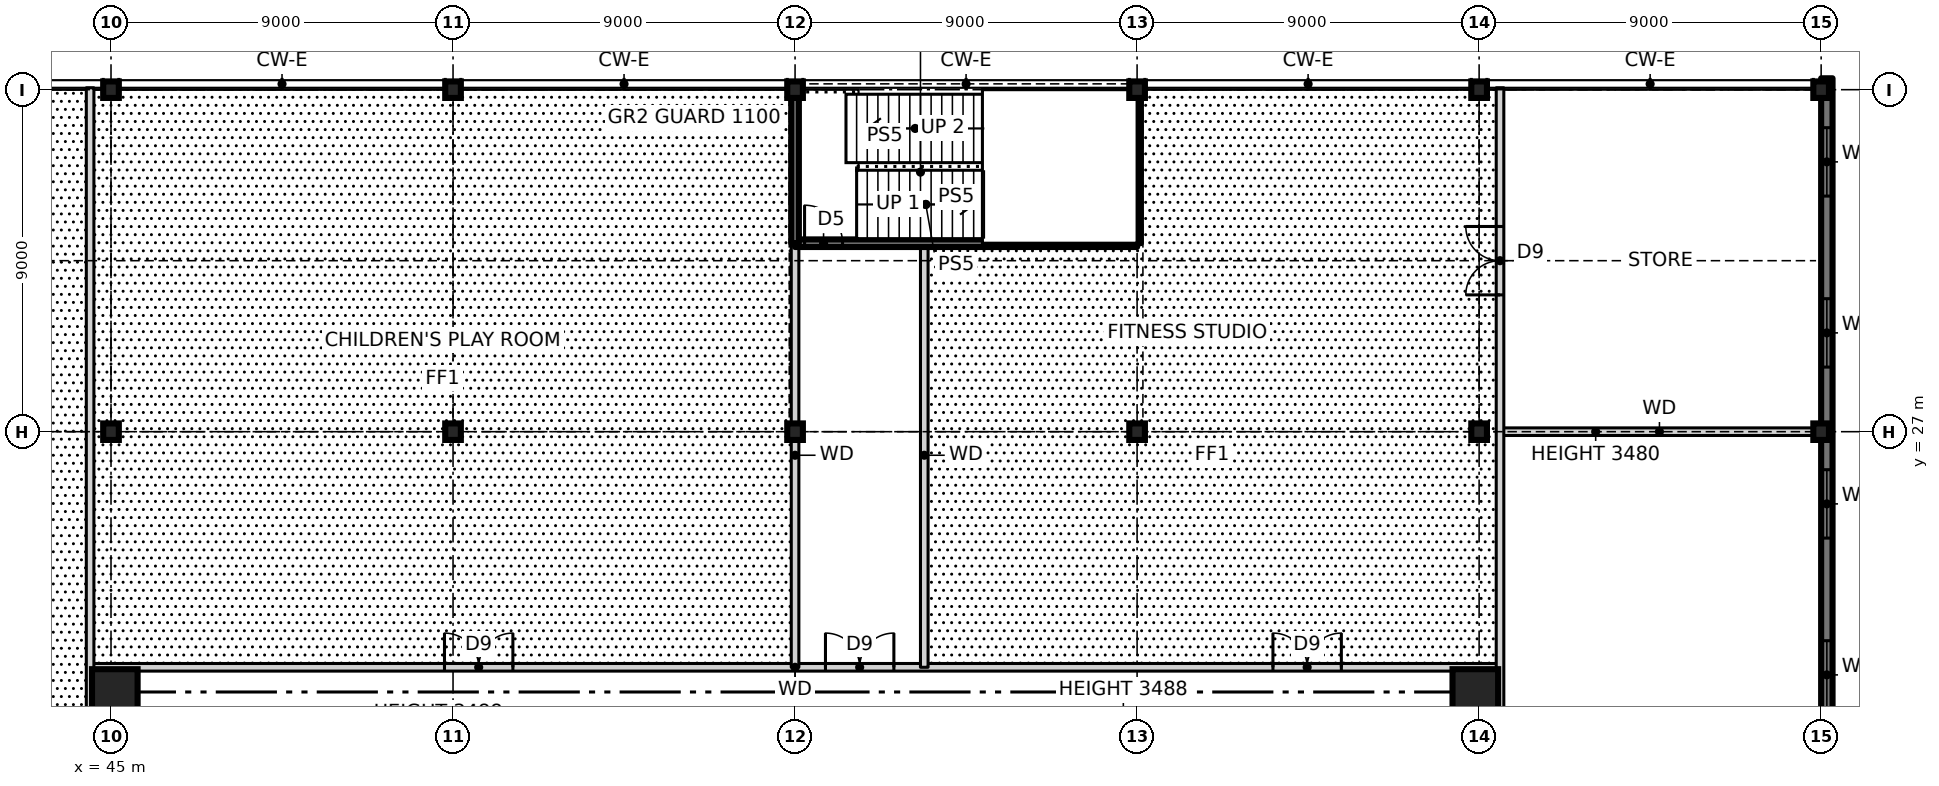
"""IFC4 building model, lengths in metres.
Left out: names, types, materials, properties, quantities, classifications, styles, units other than length and angle.
Written with IfcOpenShell. Run it as: python <this file> out.ifc"""

import sys

from ifc_helpers import new_model, si_unit, direction, frame, frame_2d, origin, origin_2d, place, context, subcontext, project, spatial, rectangle, hollow_rectangle, i_section, extrude, element, fill, save


model = new_model("IFC4")
c1 = context("Model", 3, precision=1e-05, world=origin(), true_north=direction((0.0, 1.0)))
c2 = subcontext(c1, "Body", "Model", "MODEL_VIEW")
j1 = project(units=[si_unit("LENGTHUNIT", "METRE"), si_unit("PLANEANGLEUNIT", "RADIAN")], contexts=[c1])
p1 = place(None, origin())
s1 = spatial("IfcSite", under=j1, at=p1, CompositionType="ELEMENT")
p2 = place(p1, origin())
s2 = spatial("IfcBuilding", under=s1, at=p2, CompositionType="ELEMENT")
p3 = place(p2, frame((0.0, 0.0, 6.0)))
s3 = spatial("IfcBuildingStorey", under=s2, at=p3, CompositionType="ELEMENT", Elevation=6.0)
for number, where, z_axis, x_axis in (
    (1, (80.9, 20.15, 0.0), (0.0, 0.0, 1.0), (1.0, 0.0, 0.0)),
    (2, (45.1, 20.15, 0.0), (0.0, 0.0, 1.0), (1.0, 0.0, 0.0)),
):
    element("IfcColumn", number, at=place(p3, frame(where, z_axis=z_axis, x_axis=x_axis)), inside=s3, PredefinedType="COLUMN", context=c2, shape_type="SweptSolid", body=[
        extrude(hollow_rectangle(XDim=1.2, YDim=1.2, WallThickness=0.07, at=origin_2d()), origin(), (0.0, 0.0, 1.0), 4.5),
    ])
for number, where, z_axis, x_axis in (
    (3, (45.0, 27.0, 0.0), (0.0, 0.0, 1.0), (1.0, 0.0, 0.0)),
    (4, (45.0, 36.0, 0.0), (0.0, 0.0, 1.0), (1.0, 0.0, 0.0)),
    (5, (54.0, 27.0, 0.0), (0.0, 0.0, 1.0), (1.0, 0.0, 0.0)),
    (6, (54.0, 36.0, 0.0), (0.0, 0.0, 1.0), (1.0, 0.0, 0.0)),
    (7, (63.0, 27.0, 0.0), (0.0, 0.0, 1.0), (1.0, 0.0, 0.0)),
    (8, (63.0, 36.0, 0.0), (0.0, 0.0, 1.0), (1.0, 0.0, 0.0)),
    (9, (72.0, 27.0, 0.0), (0.0, 0.0, 1.0), (1.0, 0.0, 0.0)),
    (10, (72.0, 36.0, 0.0), (0.0, 0.0, 1.0), (1.0, 0.0, 0.0)),
    (11, (81.0, 27.0, 0.0), (0.0, 0.0, 1.0), (1.0, 0.0, 0.0)),
    (12, (81.0, 36.0, 0.0), (0.0, 0.0, 1.0), (1.0, 0.0, 0.0)),
    (13, (90.0, 27.0, 0.0), (0.0, 0.0, 1.0), (1.0, 0.0, 0.0)),
    (14, (90.0, 36.0, 0.0), (0.0, 0.0, 1.0), (1.0, 0.0, 0.0)),
):
    element("IfcColumn", number, at=place(p3, frame(where, z_axis=z_axis, x_axis=x_axis)), inside=s3, PredefinedType="COLUMN", context=c2, shape_type="SweptSolid", body=[
        extrude(i_section(OverallWidth=0.411, OverallDepth=0.434, WebThickness=0.036, FlangeThickness=0.057, at=origin_2d()), origin(), (0.0, 0.0, 1.0), 4.5),
    ])
p4 = place(p3, frame((90.15, -36.3, -0.25), z_axis=(0.0, 0.0, 1.0), x_axis=(0.0, 1.0, 0.0)))
e15 = element("IfcWall", 15, at=p4, inside=s3, PredefinedType="SOLIDWALL", context=c2, shape_type="SweptSolid", body=[
    extrude(rectangle(XDim=72.6, YDim=0.3, at=frame_2d((36.3, 0.0))), origin(), (0.0, 0.0, 1.0), 3.73),
])
p5 = place(p4, frame((2.0, 0.0, 1.15)))
e16 = element("IfcOpeningElement", 16, at=p5, cuts=e15, PredefinedType="OPENING", context=c2, shape_type="SweptSolid", body=[
    extrude(rectangle(XDim=1.8, YDim=2.4, at=frame_2d((0.9, 1.2))), frame((0.0, 0.16, 0.0), z_axis=(0.0, -1.0, 0.0), x_axis=(1.0, 0.0, 0.0)), (0.0, 0.0, 1.0), 0.32),
])
p6 = place(p4, frame((6.5, 0.0, 1.15)))
e17 = element("IfcOpeningElement", 17, at=p6, cuts=e15, PredefinedType="OPENING", context=c2, shape_type="SweptSolid", body=[
    extrude(rectangle(XDim=1.8, YDim=2.4, at=frame_2d((0.9, 1.2))), frame((0.0, 0.16, 0.0), z_axis=(0.0, -1.0, 0.0), x_axis=(1.0, 0.0, 0.0)), (0.0, 0.0, 1.0), 0.32),
])
p7 = place(p4, frame((11.0, 0.0, 1.15)))
e18 = element("IfcOpeningElement", 18, at=p7, cuts=e15, PredefinedType="OPENING", context=c2, shape_type="SweptSolid", body=[
    extrude(rectangle(XDim=1.8, YDim=2.4, at=frame_2d((0.9, 1.2))), frame((0.0, 0.16, 0.0), z_axis=(0.0, -1.0, 0.0), x_axis=(1.0, 0.0, 0.0)), (0.0, 0.0, 1.0), 0.32),
])
p8 = place(p4, frame((15.5, 0.0, 1.15)))
e19 = element("IfcOpeningElement", 19, at=p8, cuts=e15, PredefinedType="OPENING", context=c2, shape_type="SweptSolid", body=[
    extrude(rectangle(XDim=1.8, YDim=2.4, at=frame_2d((0.9, 1.2))), frame((0.0, 0.16, 0.0), z_axis=(0.0, -1.0, 0.0), x_axis=(1.0, 0.0, 0.0)), (0.0, 0.0, 1.0), 0.32),
])
p9 = place(p4, frame((20.0, 0.0, 1.15)))
e20 = element("IfcOpeningElement", 20, at=p9, cuts=e15, PredefinedType="OPENING", context=c2, shape_type="SweptSolid", body=[
    extrude(rectangle(XDim=1.8, YDim=2.4, at=frame_2d((0.9, 1.2))), frame((0.0, 0.16, 0.0), z_axis=(0.0, -1.0, 0.0), x_axis=(1.0, 0.0, 0.0)), (0.0, 0.0, 1.0), 0.32),
])
p10 = place(p4, frame((24.5, 0.0, 1.15)))
e21 = element("IfcOpeningElement", 21, at=p10, cuts=e15, PredefinedType="OPENING", context=c2, shape_type="SweptSolid", body=[
    extrude(rectangle(XDim=1.8, YDim=2.4, at=frame_2d((0.9, 1.2))), frame((0.0, 0.16, 0.0), z_axis=(0.0, -1.0, 0.0), x_axis=(1.0, 0.0, 0.0)), (0.0, 0.0, 1.0), 0.32),
])
p11 = place(p4, frame((29.0, 0.0, 1.15)))
e22 = element("IfcOpeningElement", 22, at=p11, cuts=e15, PredefinedType="OPENING", context=c2, shape_type="SweptSolid", body=[
    extrude(rectangle(XDim=1.8, YDim=2.4, at=frame_2d((0.9, 1.2))), frame((0.0, 0.16, 0.0), z_axis=(0.0, -1.0, 0.0), x_axis=(1.0, 0.0, 0.0)), (0.0, 0.0, 1.0), 0.32),
])
p12 = place(p4, frame((42.5, 0.0, 1.15)))
e23 = element("IfcOpeningElement", 23, at=p12, cuts=e15, PredefinedType="OPENING", context=c2, shape_type="SweptSolid", body=[
    extrude(rectangle(XDim=1.8, YDim=2.4, at=frame_2d((0.9, 1.2))), frame((0.0, 0.16, 0.0), z_axis=(0.0, -1.0, 0.0), x_axis=(1.0, 0.0, 0.0)), (0.0, 0.0, 1.0), 0.32),
])
p13 = place(p4, frame((47.0, 0.0, 1.15)))
e24 = element("IfcOpeningElement", 24, at=p13, cuts=e15, PredefinedType="OPENING", context=c2, shape_type="SweptSolid", body=[
    extrude(rectangle(XDim=1.8, YDim=2.4, at=frame_2d((0.9, 1.2))), frame((0.0, 0.16, 0.0), z_axis=(0.0, -1.0, 0.0), x_axis=(1.0, 0.0, 0.0)), (0.0, 0.0, 1.0), 0.32),
])
p14 = place(p4, frame((51.5, 0.0, 1.15)))
e25 = element("IfcOpeningElement", 25, at=p14, cuts=e15, PredefinedType="OPENING", context=c2, shape_type="SweptSolid", body=[
    extrude(rectangle(XDim=1.8, YDim=2.4, at=frame_2d((0.9, 1.2))), frame((0.0, 0.16, 0.0), z_axis=(0.0, -1.0, 0.0), x_axis=(1.0, 0.0, 0.0)), (0.0, 0.0, 1.0), 0.32),
])
p15 = place(p4, frame((56.0, 0.0, 1.15)))
e26 = element("IfcOpeningElement", 26, at=p15, cuts=e15, PredefinedType="OPENING", context=c2, shape_type="SweptSolid", body=[
    extrude(rectangle(XDim=1.8, YDim=2.4, at=frame_2d((0.9, 1.2))), frame((0.0, 0.16, 0.0), z_axis=(0.0, -1.0, 0.0), x_axis=(1.0, 0.0, 0.0)), (0.0, 0.0, 1.0), 0.32),
])
p16 = place(p4, frame((60.5, 0.0, 1.15)))
e27 = element("IfcOpeningElement", 27, at=p16, cuts=e15, PredefinedType="OPENING", context=c2, shape_type="SweptSolid", body=[
    extrude(rectangle(XDim=1.8, YDim=2.4, at=frame_2d((0.9, 1.2))), frame((0.0, 0.16, 0.0), z_axis=(0.0, -1.0, 0.0), x_axis=(1.0, 0.0, 0.0)), (0.0, 0.0, 1.0), 0.32),
])
p17 = place(p4, frame((65.0, 0.0, 1.15)))
e28 = element("IfcOpeningElement", 28, at=p17, cuts=e15, PredefinedType="OPENING", context=c2, shape_type="SweptSolid", body=[
    extrude(rectangle(XDim=1.8, YDim=2.4, at=frame_2d((0.9, 1.2))), frame((0.0, 0.16, 0.0), z_axis=(0.0, -1.0, 0.0), x_axis=(1.0, 0.0, 0.0)), (0.0, 0.0, 1.0), 0.32),
])
p18 = place(p4, frame((69.5, 0.0, 1.15)))
e29 = element("IfcOpeningElement", 29, at=p18, cuts=e15, PredefinedType="OPENING", context=c2, shape_type="SweptSolid", body=[
    extrude(rectangle(XDim=1.8, YDim=2.4, at=frame_2d((0.9, 1.2))), frame((0.0, 0.16, 0.0), z_axis=(0.0, -1.0, 0.0), x_axis=(1.0, 0.0, 0.0)), (0.0, 0.0, 1.0), 0.32),
])
p19 = place(p2, origin())
s4 = spatial("IfcBuildingStorey", under=s2, at=p19, CompositionType="ELEMENT", Elevation=0.0)
p20 = place(p19, frame((44.494, 36.25, -0.15), z_axis=(0.0, 0.0, 1.0), x_axis=(0.0, 1.0, 0.0)))
e30 = element("IfcWall", 30, at=p20, inside=s4, PredefinedType="SOLIDWALL", context=c2, shape_type="SweptSolid", body=[
    extrude(rectangle(XDim=3.05, YDim=0.6, at=frame_2d((1.525, 0.0))), origin(), (0.0, 0.0, 1.0), 9.15),
])
p21 = place(p3, frame((44.45, 20.8, 0.0), z_axis=(0.0, 0.0, 1.0), x_axis=(1.0, 0.0, 0.0)))
e31 = element("IfcWall", 31, at=p21, inside=s3, PredefinedType="SOLIDWALL", context=c2, shape_type="SweptSolid", body=[
    extrude(rectangle(XDim=37.1, YDim=0.2, at=frame_2d((18.55, 0.0))), origin(), (0.0, 0.0, 1.0), 4.25),
])
p22 = place(p21, frame((9.325, 0.0, 0.0)))
e32 = element("IfcOpeningElement", 32, at=p22, cuts=e31, PredefinedType="OPENING", context=c2, shape_type="SweptSolid", body=[
    extrude(rectangle(XDim=1.8, YDim=2.1, at=frame_2d((0.9, 1.05))), frame((0.0, 0.11, 0.0), z_axis=(0.0, -1.0, 0.0), x_axis=(1.0, 0.0, 0.0)), (0.0, 0.0, 1.0), 0.22),
])
p23 = place(p21, frame((31.125, 0.0, 0.0)))
e33 = element("IfcOpeningElement", 33, at=p23, cuts=e31, PredefinedType="OPENING", context=c2, shape_type="SweptSolid", body=[
    extrude(rectangle(XDim=1.8, YDim=2.1, at=frame_2d((0.9, 1.05))), frame((0.0, 0.11, 0.0), z_axis=(0.0, -1.0, 0.0), x_axis=(1.0, 0.0, 0.0)), (0.0, 0.0, 1.0), 0.22),
])
p24 = place(p21, frame((19.35, 0.0, 0.0)))
e34 = element("IfcOpeningElement", 34, at=p24, cuts=e31, PredefinedType="OPENING", context=c2, shape_type="SweptSolid", body=[
    extrude(rectangle(XDim=1.8, YDim=2.1, at=frame_2d((0.9, 1.05))), frame((0.0, 0.11, 0.0), z_axis=(0.0, -1.0, 0.0), x_axis=(1.0, 0.0, 0.0)), (0.0, 0.0, 1.0), 0.22),
])
p25 = place(p3, frame((81.55, 27.0, 0.0), z_axis=(0.0, 0.0, 1.0), x_axis=(1.0, 0.0, 0.0)))
e35 = element("IfcWall", 35, at=p25, inside=s3, PredefinedType="SOLIDWALL", context=c2, shape_type="SweptSolid", body=[
    extrude(rectangle(XDim=8.39, YDim=0.2, at=frame_2d((4.195, 0.0))), origin(), (0.0, 0.0, 1.0), 3.48),
])
p26 = place(p3, frame((63.0, 31.96, 0.0), z_axis=(0.0, 0.0, 1.0), x_axis=(1.0, 0.0, 0.0)))
e36 = element("IfcWall", 36, at=p26, inside=s3, PredefinedType="SOLIDWALL", context=c2, shape_type="SweptSolid", body=[
    extrude(rectangle(XDim=9.0, YDim=0.2, at=frame_2d((4.5, 0.0))), origin(), (0.0, 0.0, 1.0), 4.5),
])
p27 = place(p26, frame((0.25, 0.0, 0.0)))
e37 = element("IfcOpeningElement", 37, at=p27, cuts=e36, PredefinedType="OPENING", context=c2, shape_type="SweptSolid", body=[
    extrude(rectangle(XDim=1.0, YDim=2.1, at=frame_2d((0.5, 1.05))), frame((0.0, 0.11, 0.0), z_axis=(0.0, -1.0, 0.0), x_axis=(1.0, 0.0, 0.0)), (0.0, 0.0, 1.0), 0.22),
])
p28 = place(p3, frame((81.55, -36.05, 0.0), z_axis=(0.0, 0.0, 1.0), x_axis=(0.0, 1.0, 0.0)))
e38 = element("IfcWall", 38, at=p28, inside=s3, PredefinedType="SOLIDWALL", context=c2, shape_type="SweptSolid", body=[
    extrude(rectangle(XDim=72.1, YDim=0.2, at=frame_2d((36.05, 0.0))), origin(), (0.0, 0.0, 1.0), 4.25),
])
p29 = place(p28, frame((66.65, 0.0, 0.0)))
e39 = element("IfcOpeningElement", 39, at=p29, cuts=e38, PredefinedType="OPENING", context=c2, shape_type="SweptSolid", body=[
    extrude(rectangle(XDim=1.8, YDim=2.1, at=frame_2d((0.9, 1.05))), frame((0.0, 0.11, 0.0), z_axis=(0.0, -1.0, 0.0), x_axis=(1.0, 0.0, 0.0)), (0.0, 0.0, 1.0), 0.22),
])
p30 = place(p28, frame((25.6, 0.0, 0.0)))
e40 = element("IfcOpeningElement", 40, at=p30, cuts=e38, PredefinedType="OPENING", context=c2, shape_type="SweptSolid", body=[
    extrude(rectangle(XDim=1.8, YDim=2.1, at=frame_2d((0.9, 1.05))), frame((0.0, 0.11, 0.0), z_axis=(0.0, -1.0, 0.0), x_axis=(1.0, 0.0, 0.0)), (0.0, 0.0, 1.0), 0.22),
])
p31 = place(p28, frame((35.45, 0.0, 0.0)))
e41 = element("IfcOpeningElement", 41, at=p31, cuts=e38, PredefinedType="OPENING", context=c2, shape_type="SweptSolid", body=[
    extrude(rectangle(XDim=1.8, YDim=2.1, at=frame_2d((0.9, 1.05))), frame((0.0, 0.11, 0.0), z_axis=(0.0, -1.0, 0.0), x_axis=(1.0, 0.0, 0.0)), (0.0, 0.0, 1.0), 0.22),
])
p32 = place(p28, frame((50.15, 0.0, 0.0)))
e42 = element("IfcOpeningElement", 42, at=p32, cuts=e38, PredefinedType="OPENING", context=c2, shape_type="SweptSolid", body=[
    extrude(rectangle(XDim=1.8, YDim=2.1, at=frame_2d((0.9, 1.05))), frame((0.0, 0.11, 0.0), z_axis=(0.0, -1.0, 0.0), x_axis=(1.0, 0.0, 0.0)), (0.0, 0.0, 1.0), 0.22),
])
p33 = place(p3, frame((72.0, 31.96, 0.0), z_axis=(0.0, 0.0, 1.0), x_axis=(0.0, 1.0, 0.0)))
e43 = element("IfcWall", 43, at=p33, inside=s3, PredefinedType="SOLIDWALL", context=c2, shape_type="SweptSolid", body=[
    extrude(rectangle(XDim=3.823, YDim=0.2, at=frame_2d((1.911, 0.0))), origin(), (0.0, 0.0, 1.0), 4.5),
])
for number, where, z_axis, x_axis in (
    (44, (66.4, 20.8, 0.0), (0.0, 0.0, 1.0), (0.0, 1.0, 0.0)),
    (45, (63.0, 20.8, 0.0), (0.0, 0.0, 1.0), (0.0, 1.0, 0.0)),
):
    element("IfcWall", number, at=place(p3, frame(where, z_axis=z_axis, x_axis=x_axis)), inside=s3, PredefinedType="SOLIDWALL", context=c2, shape_type="SweptSolid", body=[
        extrude(rectangle(XDim=11.16, YDim=0.2, at=frame_2d((5.58, 0.0))), origin(), (0.0, 0.0, 1.0), 4.25),
    ])
p34 = place(p3, frame((63.0, 31.96, 0.0), z_axis=(0.0, 0.0, 1.0), x_axis=(0.0, 1.0, 0.0)))
e46 = element("IfcWall", 46, at=p34, inside=s3, PredefinedType="SOLIDWALL", context=c2, shape_type="SweptSolid", body=[
    extrude(rectangle(XDim=3.823, YDim=0.2, at=frame_2d((1.911, 0.0))), origin(), (0.0, 0.0, 1.0), 4.5),
])
p35 = place(p3, frame((44.45, -36.05, 0.0), z_axis=(0.0, 0.0, 1.0), x_axis=(0.0, 1.0, 0.0)))
e47 = element("IfcWall", 47, at=p35, inside=s3, PredefinedType="SOLIDWALL", context=c2, shape_type="SweptSolid", body=[
    extrude(rectangle(XDim=72.1, YDim=0.2, at=frame_2d((36.05, 0.0))), origin(), (0.0, 0.0, 1.0), 4.25),
])
p36 = place(p35, frame((25.6, 0.0, 0.0)))
e48 = element("IfcOpeningElement", 48, at=p36, cuts=e47, PredefinedType="OPENING", context=c2, shape_type="SweptSolid", body=[
    extrude(rectangle(XDim=1.8, YDim=2.1, at=frame_2d((0.9, 1.05))), frame((0.0, 0.11, 0.0), z_axis=(0.0, -1.0, 0.0), x_axis=(1.0, 0.0, 0.0)), (0.0, 0.0, 1.0), 0.22),
])
p37 = place(p35, frame((44.7, 0.0, 0.0)))
e49 = element("IfcOpeningElement", 49, at=p37, cuts=e47, PredefinedType="OPENING", context=c2, shape_type="SweptSolid", body=[
    extrude(rectangle(XDim=1.8, YDim=2.1, at=frame_2d((0.9, 1.05))), frame((0.0, 0.11, 0.0), z_axis=(0.0, -1.0, 0.0), x_axis=(1.0, 0.0, 0.0)), (0.0, 0.0, 1.0), 0.22),
])
p38 = place(p15, origin())
e50 = element("IfcWindow", 50, at=p38, inside=s3, PartitioningType="SINGLE_PANEL", PredefinedType="WINDOW", context=c2, shape_type="SweptSolid", body=[
    extrude(rectangle(XDim=1.8, YDim=2.4, at=frame_2d((0.9, 1.2))), frame((0.0, 0.03, 0.0), z_axis=(0.0, -1.0, 0.0), x_axis=(1.0, 0.0, 0.0)), (0.0, 0.0, 1.0), 0.06),
])
fill(e26, e50)
p39 = place(p16, origin())
e51 = element("IfcWindow", 51, at=p39, inside=s3, PartitioningType="SINGLE_PANEL", PredefinedType="WINDOW", context=c2, shape_type="SweptSolid", body=[
    extrude(rectangle(XDim=1.8, YDim=2.4, at=frame_2d((0.9, 1.2))), frame((0.0, 0.03, 0.0), z_axis=(0.0, -1.0, 0.0), x_axis=(1.0, 0.0, 0.0)), (0.0, 0.0, 1.0), 0.06),
])
fill(e27, e51)
p40 = place(p17, origin())
e52 = element("IfcWindow", 52, at=p40, inside=s3, PartitioningType="SINGLE_PANEL", PredefinedType="WINDOW", context=c2, shape_type="SweptSolid", body=[
    extrude(rectangle(XDim=1.8, YDim=2.4, at=frame_2d((0.9, 1.2))), frame((0.0, 0.03, 0.0), z_axis=(0.0, -1.0, 0.0), x_axis=(1.0, 0.0, 0.0)), (0.0, 0.0, 1.0), 0.06),
])
fill(e28, e52)
p41 = place(p18, origin())
e53 = element("IfcWindow", 53, at=p41, inside=s3, PartitioningType="SINGLE_PANEL", PredefinedType="WINDOW", context=c2, shape_type="SweptSolid", body=[
    extrude(rectangle(XDim=1.8, YDim=2.4, at=frame_2d((0.9, 1.2))), frame((0.0, 0.03, 0.0), z_axis=(0.0, -1.0, 0.0), x_axis=(1.0, 0.0, 0.0)), (0.0, 0.0, 1.0), 0.06),
])
fill(e29, e53)
p42 = place(p22, origin())
e54 = element("IfcDoor", 54, at=p42, inside=s3, OperationType="DOUBLE_DOOR_SINGLE_SWING", PredefinedType="DOOR", context=c2, shape_type="SweptSolid", body=[
    extrude(rectangle(XDim=1.8, YDim=2.1, at=frame_2d((0.9, 1.05))), frame((0.0, 0.025, 0.0), z_axis=(0.0, -1.0, 0.0), x_axis=(1.0, 0.0, 0.0)), (0.0, 0.0, 1.0), 0.05),
])
fill(e32, e54)
p43 = place(p23, origin())
e55 = element("IfcDoor", 55, at=p43, inside=s3, OperationType="DOUBLE_DOOR_SINGLE_SWING", PredefinedType="DOOR", context=c2, shape_type="SweptSolid", body=[
    extrude(rectangle(XDim=1.8, YDim=2.1, at=frame_2d((0.9, 1.05))), frame((0.0, 0.025, 0.0), z_axis=(0.0, -1.0, 0.0), x_axis=(1.0, 0.0, 0.0)), (0.0, 0.0, 1.0), 0.05),
])
fill(e33, e55)
p44 = place(p29, origin())
e56 = element("IfcDoor", 56, at=p44, inside=s3, OperationType="DOUBLE_DOOR_SINGLE_SWING", PredefinedType="DOOR", context=c2, shape_type="SweptSolid", body=[
    extrude(rectangle(XDim=1.8, YDim=2.1, at=frame_2d((0.9, 1.05))), frame((0.0, 0.025, 0.0), z_axis=(0.0, -1.0, 0.0), x_axis=(1.0, 0.0, 0.0)), (0.0, 0.0, 1.0), 0.05),
])
fill(e39, e56)
p45 = place(p24, origin())
e57 = element("IfcDoor", 57, at=p45, inside=s3, OperationType="DOUBLE_DOOR_SINGLE_SWING", PredefinedType="DOOR", context=c2, shape_type="SweptSolid", body=[
    extrude(rectangle(XDim=1.8, YDim=2.1, at=frame_2d((0.9, 1.05))), frame((0.0, 0.025, 0.0), z_axis=(0.0, -1.0, 0.0), x_axis=(1.0, 0.0, 0.0)), (0.0, 0.0, 1.0), 0.05),
])
fill(e34, e57)
p46 = place(p27, origin())
e58 = element("IfcDoor", 58, at=p46, inside=s3, OperationType="SINGLE_SWING_LEFT", PredefinedType="DOOR", context=c2, shape_type="SweptSolid", body=[
    extrude(rectangle(XDim=1.0, YDim=2.1, at=frame_2d((0.5, 1.05))), frame((0.0, 0.025, 0.0), z_axis=(0.0, -1.0, 0.0), x_axis=(1.0, 0.0, 0.0)), (0.0, 0.0, 1.0), 0.05),
])
fill(e37, e58)
save(model, sys.argv[1])
